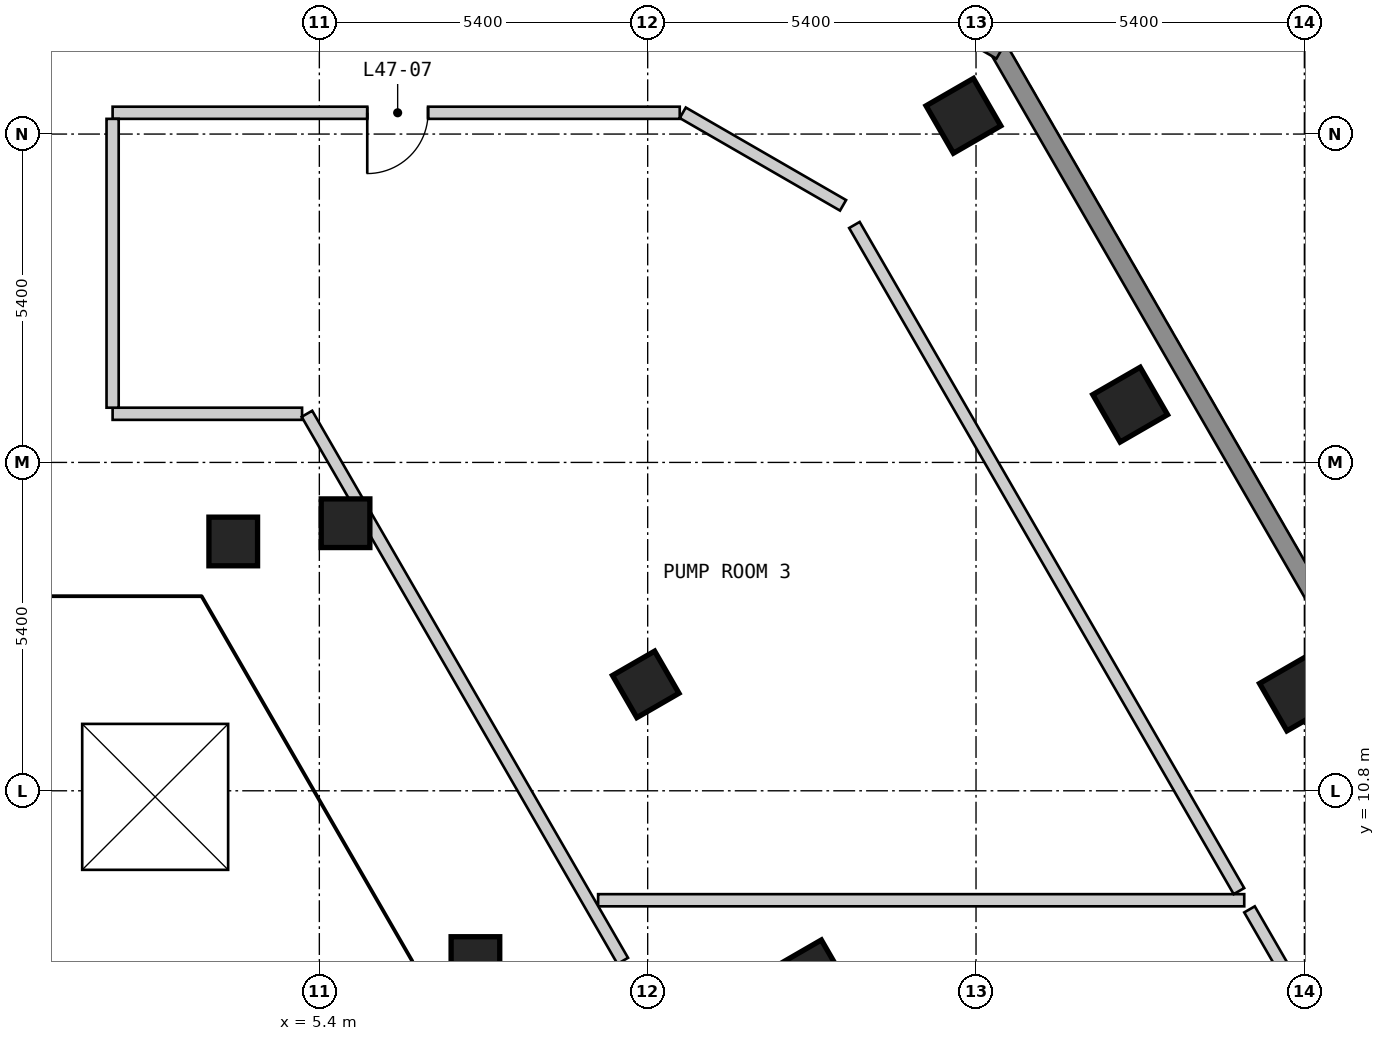
"""IFC4 building model, lengths in metres.
Left out: names, types, materials, properties, quantities, classifications, styles, units other than length and angle.
Written with IfcOpenShell. Run it as: python <this file> out.ifc"""

import sys

from ifc_helpers import new_model, si_unit, direction, frame, frame_2d, origin, origin_2d, place, context, subcontext, project, spatial, polyline, rectangle, outline, extrude, element, fill, save


model = new_model("IFC4")
c1 = context("Model", 3, precision=1e-05, world=origin(), true_north=direction((0.0, 1.0)))
c2 = subcontext(c1, "Body", "Model", "MODEL_VIEW")
j1 = project(units=[si_unit("LENGTHUNIT", "METRE"), si_unit("PLANEANGLEUNIT", "RADIAN")], contexts=[c1])
p1 = place(None, origin())
s1 = spatial("IfcSite", under=j1, at=p1, CompositionType="ELEMENT")
p2 = place(p1, origin())
s2 = spatial("IfcBuilding", under=s1, at=p2, CompositionType="ELEMENT")
p3 = place(p2, frame((0.0, 0.0, 153.6)))
s3 = spatial("IfcBuildingStorey", under=s2, at=p3, CompositionType="ELEMENT", Elevation=153.6)
for number, where, z_axis, x_axis in (
    (1, (21.478, 12.4, 0.0), (0.0, 0.0, 1.0), (-0.5, 0.866, 0.0)),
    (2, (18.735, 17.15, 0.0), (0.0, 0.0, 1.0), (-0.5, 0.866, 0.0)),
    (3, (15.993, 21.9, 0.0), (0.0, 0.0, 1.0), (-0.5, 0.866, 0.0)),
):
    element("IfcColumn", number, at=place(p3, frame(where, z_axis=z_axis, x_axis=x_axis)), inside=s3, PredefinedType="COLUMN", context=c2, shape_type="SweptSolid", body=[
        extrude(rectangle(XDim=0.9, YDim=0.9, at=origin_2d()), origin(), (0.0, 0.0, 1.0), 3.6),
    ])
for number, where, z_axis, x_axis in (
    (4, (13.51, 7.8, 0.0), (0.0, 0.0, 1.0), (-0.5, 0.866, 0.0)),
    (5, (7.967, 8.0, 0.0), (0.0, 0.0, 1.0), (1.0, 0.0, 0.0)),
    (6, (10.768, 12.55, 0.0), (0.0, 0.0, 1.0), (-0.5, 0.866, 0.0)),
):
    element("IfcColumn", number, at=place(p3, frame(where, z_axis=z_axis, x_axis=x_axis)), inside=s3, PredefinedType="COLUMN", context=c2, shape_type="SweptSolid", body=[
        extrude(rectangle(XDim=0.8, YDim=0.8, at=origin_2d()), origin(), (0.0, 0.0, 1.0), 3.6),
    ])
for number, where, z_axis, x_axis in (
    (7, (5.831, 15.2, 0.0), (0.0, 0.0, 1.0), (-1.0, 0.0, 0.0)),
    (8, (3.984, 14.9, 0.0), (0.0, 0.0, 1.0), (1.0, 0.0, 0.0)),
):
    element("IfcColumn", number, at=place(p3, frame(where, z_axis=z_axis, x_axis=x_axis)), inside=s3, PredefinedType="COLUMN", context=c2, shape_type="SweptSolid", body=[
        extrude(rectangle(XDim=0.8, YDim=0.8, at=origin_2d()), origin(), (0.0, 0.0, 1.0), 2.6),
    ])
p4 = place(p3, frame((28.218, 2.825, 0.0), z_axis=(0.0, 0.0, 1.0), x_axis=(-0.500020536353, 0.866013546791, 0.0)))
e9 = element("IfcWall", 9, at=p4, inside=s3, PredefinedType="SOLIDWALL", context=c2, shape_type="SweptSolid", body=[
    extrude(outline(polyline([(0.0, -0.15), (23.325, -0.15), (23.245, 0.15), (0.08, 0.15), (0.0, -0.15)])), origin(), (0.0, 0.0, 1.0), 2.6),
])
p5 = place(p3, frame((16.61, 22.97, 0.0), z_axis=(0.0, 0.0, 1.0), x_axis=(-0.866022959057, 0.500004234368, 0.0)))
e10 = element("IfcWall", 10, at=p5, inside=s3, PredefinedType="SOLIDWALL", context=c2, shape_type="SweptSolid", body=[
    extrude(outline(polyline([(0.0, -0.15), (5.0, -0.15), (4.92, 0.15), (0.08, 0.15), (0.0, -0.15)])), origin(), (0.0, 0.0, 1.0), 2.6),
])
p6 = place(p3, frame((9.985, 9.0, 0.0), z_axis=(0.0, 0.0, 1.0), x_axis=(1.0, 0.0, 0.0)))
e11 = element("IfcWall", 11, at=p6, inside=s3, PredefinedType="SOLIDWALL", context=c2, shape_type="SweptSolid", body=[
    extrude(rectangle(XDim=10.626, YDim=0.2, at=frame_2d((5.313, 0.0))), origin(), (0.0, 0.0, 1.0), 2.6),
])
p7 = place(p3, frame((2.0, 17.0, 0.0), z_axis=(0.0, 0.0, 1.0), x_axis=(1.0, 0.0, 0.0)))
e12 = element("IfcWall", 12, at=p7, inside=s3, PredefinedType="SOLIDWALL", context=c2, shape_type="SweptSolid", body=[
    extrude(rectangle(XDim=3.116, YDim=0.2, at=frame_2d((1.558, 0.0))), origin(), (0.0, 0.0, 1.0), 2.6),
])
p8 = place(p3, frame((2.0, 21.95, 0.0), z_axis=(0.0, 0.0, 1.0), x_axis=(1.0, 0.0, 0.0)))
e13 = element("IfcWall", 13, at=p8, inside=s3, PredefinedType="SOLIDWALL", context=c2, shape_type="SweptSolid", body=[
    extrude(rectangle(XDim=9.327, YDim=0.2, at=frame_2d((4.664, 0.0))), origin(), (0.0, 0.0, 1.0), 2.6),
])
p9 = place(p8, frame((5.188, 0.0, 0.0), z_axis=(0.0, 0.0, 1.0), x_axis=(-1.0, 0.0, 0.0)))
e14 = element("IfcOpeningElement", 14, at=p9, cuts=e13, PredefinedType="OPENING", context=c2, shape_type="SweptSolid", body=[
    extrude(rectangle(XDim=1.0, YDim=2.1, at=frame_2d((0.5, 1.05))), frame((0.0, 0.11, 0.0), z_axis=(0.0, -1.0, 0.0), x_axis=(1.0, 0.0, 0.0)), (0.0, 0.0, 1.0), 0.22),
])
p10 = place(p3, frame((2.0, 17.1, 0.0), z_axis=(0.0, 0.0, 1.0), x_axis=(0.0, 1.0, 0.0)))
e15 = element("IfcWall", 15, at=p10, inside=s3, PredefinedType="SOLIDWALL", context=c2, shape_type="SweptSolid", body=[
    extrude(rectangle(XDim=4.75, YDim=0.2, at=frame_2d((2.375, 0.0))), origin(), (0.0, 0.0, 1.0), 2.6),
])
p11 = place(p3, frame((11.377, 21.95, 0.0), z_axis=(0.0, 0.0, 1.0), x_axis=(0.866013277291, -0.500021003115, 0.0)))
e16 = element("IfcWall", 16, at=p11, inside=s3, PredefinedType="SOLIDWALL", context=c2, shape_type="SweptSolid", body=[
    extrude(rectangle(XDim=3.044, YDim=0.2, at=frame_2d((1.522, 0.0))), origin(), (0.0, 0.0, 1.0), 2.6),
])
p12 = place(p3, frame((5.196, 17.0, 0.0), z_axis=(0.0, 0.0, 1.0), x_axis=(0.499955721747, -0.866050966336, 0.0)))
e17 = element("IfcWall", 17, at=p12, inside=s3, PredefinedType="SOLIDWALL", context=c2, shape_type="SweptSolid", body=[
    extrude(rectangle(XDim=10.389, YDim=0.2, at=frame_2d((5.194, 0.0))), origin(), (0.0, 0.0, 1.0), 2.6),
])
p13 = place(p3, frame((14.2, 20.105, 0.0), z_axis=(0.0, 0.0, 1.0), x_axis=(0.499944105132, -0.866057672296, 0.0)))
e18 = element("IfcWall", 18, at=p13, inside=s3, PredefinedType="SOLIDWALL", context=c2, shape_type="SweptSolid", body=[
    extrude(rectangle(XDim=12.649, YDim=0.2, at=frame_2d((6.325, 0.0))), origin(), (0.0, 0.0, 1.0), 2.6),
])
p14 = place(p3, frame((20.698, 8.85, 0.0), z_axis=(0.0, 0.0, 1.0), x_axis=(0.499957378818, -0.866050009737, 0.0)))
e19 = element("IfcWall", 19, at=p14, inside=s3, PredefinedType="SOLIDWALL", context=c2, shape_type="SweptSolid", body=[
    extrude(rectangle(XDim=7.737, YDim=0.2, at=frame_2d((3.868, 0.0))), origin(), (0.0, 0.0, 1.0), 2.6),
])
p15 = place(p3, frame((0.0, 0.0, -0.4)))
p16 = place(p15, frame((2.7, 10.7, 0.0)))
p17 = place(p16, frame((0.0, 0.0, 0.35)))
e20 = element("IfcWindow", 20, at=p17, inside=s3, PartitioningType="SINGLE_PANEL", PredefinedType="SKYLIGHT", context=c2, shape_type="SweptSolid", body=[
    extrude(rectangle(XDim=2.4, YDim=2.4, at=origin_2d()), origin(), (0.0, 0.0, 1.0), 0.05),
])
p18 = place(p9, origin())
e21 = element("IfcDoor", 21, at=p18, inside=s3, OperationType="SINGLE_SWING_RIGHT", PredefinedType="DOOR", context=c2, shape_type="SweptSolid", body=[
    extrude(rectangle(XDim=1.0, YDim=2.1, at=frame_2d((0.5, 1.05))), frame((0.0, 0.025, 0.0), z_axis=(0.0, -1.0, 0.0), x_axis=(1.0, 0.0, 0.0)), (0.0, 0.0, 1.0), 0.05),
])
fill(e14, e21)
save(model, sys.argv[1])
